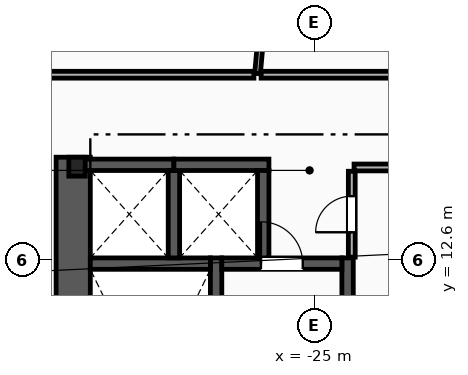
"""IFC4 building model, lengths in metres.
Left out: names, types, materials, properties, quantities, classifications, styles, units other than length and angle.
Written with IfcOpenShell. Run it as: python <this file> out.ifc"""

import sys

from ifc_helpers import new_model, si_unit, direction, frame, frame_2d, origin, origin_2d, place, context, subcontext, project, spatial, rectangle, i_section, extrude, element, fill, save


model = new_model("IFC4")
c1 = context("Model", 3, precision=1e-05, world=origin(), true_north=direction((0.0, 1.0)))
c2 = subcontext(c1, "Body", "Model", "MODEL_VIEW")
j1 = project(units=[si_unit("LENGTHUNIT", "METRE"), si_unit("PLANEANGLEUNIT", "RADIAN")], contexts=[c1])
p1 = place(None, origin())
s1 = spatial("IfcSite", under=j1, at=p1, CompositionType="ELEMENT")
p2 = place(p1, origin())
s2 = spatial("IfcBuilding", under=s1, at=p2, CompositionType="ELEMENT")
p3 = place(p2, frame((0.0, 0.0, 12.0)))
s3 = spatial("IfcBuildingStorey", under=s2, at=p3, CompositionType="ELEMENT", Elevation=12.0)
p4 = place(p3, frame((-31.25, 15.05, 0.0), z_axis=(0.0, 0.0, 1.0), x_axis=(1.0, 0.0, 0.0)))
e1 = element("IfcColumn", 1, at=p4, inside=s3, PredefinedType="COLUMN", context=c2, shape_type="SweptSolid", body=[
    extrude(i_section(OverallWidth=0.432, OverallDepth=0.498, WebThickness=0.056, FlangeThickness=0.089, FilletRadius=0.018, at=origin_2d()), origin(), (0.0, 0.0, 1.0), 4.0),
])
p5 = place(p3, frame((-31.35, 1.97, 0.0), z_axis=(0.0, 0.0, 1.0), x_axis=(0.0, 1.0, 0.0)))
e2 = element("IfcWall", 2, at=p5, inside=s3, PredefinedType="SHEAR", context=c2, shape_type="SweptSolid", body=[
    extrude(rectangle(XDim=13.33, YDim=0.9, at=frame_2d((6.665, 0.0))), origin(), (0.0, 0.0, 1.0), 3.65),
])
for number, where, z_axis, x_axis in (
    (3, (-27.59, 1.97, 0.0), (0.0, 0.0, 1.0), (0.0, 1.0, 0.0)),
    (4, (-24.13, 1.97, 0.0), (0.0, 0.0, 1.0), (0.0, 1.0, 0.0)),
):
    element("IfcWall", number, at=place(p3, frame(where, z_axis=z_axis, x_axis=x_axis)), inside=s3, PredefinedType="SHEAR", context=c2, shape_type="SweptSolid", body=[
        extrude(rectangle(XDim=10.68, YDim=0.3, at=frame_2d((5.34, 0.0))), origin(), (0.0, 0.0, 1.0), 3.65),
    ])
p6 = place(p3, frame((-30.9, 12.5, 0.0), z_axis=(0.0, 0.0, 1.0), x_axis=(1.0, 0.0, 0.0)))
e5 = element("IfcWall", 5, at=p6, inside=s3, PredefinedType="SHEAR", context=c2, shape_type="SweptSolid", body=[
    extrude(rectangle(XDim=3.16, YDim=0.3, at=frame_2d((1.58, 0.0))), origin(), (0.0, 0.0, 1.0), 3.65),
])
p7 = place(p3, frame((-27.44, 12.5, 0.0), z_axis=(0.0, 0.0, 1.0), x_axis=(1.0, 0.0, 0.0)))
e6 = element("IfcWall", 6, at=p7, inside=s3, PredefinedType="SHEAR", context=c2, shape_type="SweptSolid", body=[
    extrude(rectangle(XDim=3.16, YDim=0.3, at=frame_2d((1.58, 0.0))), origin(), (0.0, 0.0, 1.0), 3.65),
])
p8 = place(p7, frame((1.03, 0.0, 0.0)))
e7 = element("IfcOpeningElement", 7, at=p8, cuts=e6, PredefinedType="OPENING", context=c2, shape_type="SweptSolid", body=[
    extrude(rectangle(XDim=1.1, YDim=2.15, at=frame_2d((0.55, 1.075))), frame((0.0, 0.16, 0.0), z_axis=(0.0, -1.0, 0.0), x_axis=(1.0, 0.0, 0.0)), (0.0, 0.0, 1.0), 0.32),
])
p9 = place(p3, frame((-31.2, 15.1, 0.0), z_axis=(0.0, 0.0, 1.0), x_axis=(1.0, 0.0, 0.0)))
e8 = element("IfcWall", 8, at=p9, inside=s3, PredefinedType="SHEAR", context=c2, shape_type="SweptSolid", body=[
    extrude(rectangle(XDim=2.5, YDim=0.3, at=frame_2d((1.25, 0.0))), origin(), (0.0, 0.0, 1.0), 3.65),
])
p10 = place(p3, frame((-28.7, 12.65, 0.0), z_axis=(0.0, 0.0, 1.0), x_axis=(0.0, 1.0, 0.0)))
e9 = element("IfcWall", 9, at=p10, inside=s3, PredefinedType="SHEAR", context=c2, shape_type="SweptSolid", body=[
    extrude(rectangle(XDim=2.3, YDim=0.3, at=frame_2d((1.15, 0.0))), origin(), (0.0, 0.0, 1.0), 3.65),
])
p11 = place(p3, frame((-28.7, 15.1, 0.0), z_axis=(0.0, 0.0, 1.0), x_axis=(1.0, 0.0, 0.0)))
e10 = element("IfcWall", 10, at=p11, inside=s3, PredefinedType="SHEAR", context=c2, shape_type="SweptSolid", body=[
    extrude(rectangle(XDim=2.5, YDim=0.3, at=frame_2d((1.25, 0.0))), origin(), (0.0, 0.0, 1.0), 3.65),
])
p12 = place(p3, frame((-26.35, 12.65, 0.0), z_axis=(0.0, 0.0, 1.0), x_axis=(0.0, 1.0, 0.0)))
e11 = element("IfcWall", 11, at=p12, inside=s3, PredefinedType="SHEAR", context=c2, shape_type="SweptSolid", body=[
    extrude(rectangle(XDim=2.3, YDim=0.3, at=frame_2d((1.15, 0.0))), origin(), (0.0, 0.0, 1.0), 3.65),
])
p13 = place(p3, frame((-23.96, 15.03, 0.0), z_axis=(0.0, 0.0, 1.0), x_axis=(1.0, 0.0, 0.0)))
e12 = element("IfcWall", 12, at=p13, inside=s3, PredefinedType="PARTITIONING", context=c2, shape_type="SweptSolid", body=[
    extrude(rectangle(XDim=2.61, YDim=0.18, at=frame_2d((1.305, 0.0))), origin(), (0.0, 0.0, 1.0), 2.723),
])
p14 = place(p3, frame((-24.02, 12.67, 0.0), z_axis=(0.0, 0.0, 1.0), x_axis=(0.0, 1.0, 0.0)))
e13 = element("IfcWall", 13, at=p14, inside=s3, PredefinedType="PARTITIONING", context=c2, shape_type="SweptSolid", body=[
    extrude(rectangle(XDim=2.26, YDim=0.18, at=frame_2d((1.13, 0.0))), origin(), (0.0, 0.0, 1.0), 3.65),
])
p15 = place(p14, frame((0.655, 0.0, 0.0)))
e14 = element("IfcOpeningElement", 14, at=p15, cuts=e13, PredefinedType="OPENING", context=c2, shape_type="SweptSolid", body=[
    extrude(rectangle(XDim=0.95, YDim=2.1, at=frame_2d((0.475, 1.05))), frame((0.0, 0.1, 0.0), z_axis=(0.0, -1.0, 0.0), x_axis=(1.0, 0.0, 0.0)), (0.0, 0.0, 1.0), 0.2),
])
p16 = place(p3, frame((-26.5, 17.5, 0.0), z_axis=(0.0, 0.0, 1.0), x_axis=(0.090192004823, 0.995924395858, 0.0)))
e15 = element("IfcWall", 15, at=p16, inside=s3, PredefinedType="PARTITIONING", context=c2, shape_type="SweptSolid", body=[
    extrude(rectangle(XDim=9.734, YDim=0.15, at=frame_2d((4.867, 0.0))), origin(), (0.0, 0.0, 1.0), 3.65),
])
p17 = place(p16, frame((4.167, 0.0, 1.05)))
e16 = element("IfcOpeningElement", 16, at=p17, cuts=e15, PredefinedType="OPENING", context=c2, shape_type="SweptSolid", body=[
    extrude(rectangle(XDim=1.4, YDim=1.5, at=frame_2d((0.7, 0.75))), frame((0.0, 0.085, 0.0), z_axis=(0.0, -1.0, 0.0), x_axis=(1.0, 0.0, 0.0)), (0.0, 0.0, 1.0), 0.17),
])
p18 = place(p3, frame((-26.595, 17.47, 0.0), z_axis=(0.0, 0.0, 1.0), x_axis=(-1.0, 0.0, 0.0)))
e17 = element("IfcWall", 17, at=p18, inside=s3, PredefinedType="PARTITIONING", context=c2, shape_type="SweptSolid", body=[
    extrude(rectangle(XDim=7.033, YDim=0.18, at=frame_2d((3.517, 0.0))), origin(), (0.0, 0.0, 1.0), 2.877),
])
p19 = place(p3, frame((-16.822, 17.47, 0.0), z_axis=(0.0, 0.0, 1.0), x_axis=(-1.0, 0.0, 0.0)))
e18 = element("IfcWall", 18, at=p19, inside=s3, PredefinedType="PARTITIONING", context=c2, shape_type="SweptSolid", body=[
    extrude(rectangle(XDim=9.583, YDim=0.18, at=frame_2d((4.792, 0.0))), origin(), (0.0, 0.0, 1.0), 3.65),
])
p20 = place(p19, frame((3.992, 0.0, 0.0)))
e19 = element("IfcOpeningElement", 19, at=p20, cuts=e18, PredefinedType="OPENING", context=c2, shape_type="SweptSolid", body=[
    extrude(rectangle(XDim=1.6, YDim=2.2, at=frame_2d((0.8, 1.1))), frame((0.0, 0.1, 0.0), z_axis=(0.0, -1.0, 0.0), x_axis=(1.0, 0.0, 0.0)), (0.0, 0.0, 1.0), 0.2),
])
p21 = place(p8, origin())
e20 = element("IfcDoor", 20, at=p21, inside=s3, OperationType="SINGLE_SWING_LEFT", PredefinedType="DOOR", context=c2, shape_type="SweptSolid", body=[
    extrude(rectangle(XDim=1.1, YDim=2.15, at=frame_2d((0.55, 1.075))), frame((0.0, 0.025, 0.0), z_axis=(0.0, -1.0, 0.0), x_axis=(1.0, 0.0, 0.0)), (0.0, 0.0, 1.0), 0.05),
])
fill(e7, e20)
p22 = place(p15, origin())
e21 = element("IfcDoor", 21, at=p22, inside=s3, OperationType="SINGLE_SWING_LEFT", PredefinedType="DOOR", context=c2, shape_type="SweptSolid", body=[
    extrude(rectangle(XDim=0.95, YDim=2.1, at=frame_2d((0.475, 1.05))), frame((0.0, 0.025, 0.0), z_axis=(0.0, -1.0, 0.0), x_axis=(1.0, 0.0, 0.0)), (0.0, 0.0, 1.0), 0.05),
])
fill(e14, e21)
save(model, sys.argv[1])
